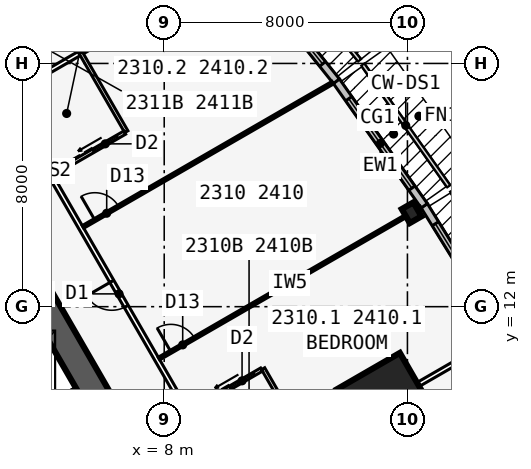
"""IFC4 building model, lengths in metres.
Left out: names, types, materials, properties, quantities, classifications, styles, units other than length and angle.
Written with IfcOpenShell. Run it as: python <this file> out.ifc"""

import sys

from ifc_helpers import new_model, si_unit, direction, frame, frame_2d, origin, origin_2d, place, context, subcontext, project, spatial, rectangle, i_section, extrude, element, fill, save


model = new_model("IFC4")
c1 = context("Model", 3, precision=1e-05, world=origin(), true_north=direction((0.0, 1.0)))
c2 = subcontext(c1, "Body", "Model", "MODEL_VIEW")
j1 = project(units=[si_unit("LENGTHUNIT", "METRE"), si_unit("PLANEANGLEUNIT", "RADIAN")], contexts=[c1])
p1 = place(None, origin())
s1 = spatial("IfcSite", under=j1, at=p1, CompositionType="ELEMENT")
p2 = place(p1, origin())
s2 = spatial("IfcBuilding", under=s1, at=p2, CompositionType="ELEMENT")
p3 = place(p2, frame((0.0, 0.0, 89.7)))
s3 = spatial("IfcBuildingStorey", under=s2, at=p3, CompositionType="ELEMENT", Elevation=89.7)
p4 = place(p3, frame((16.5, -9.526, 0.0), z_axis=(0.0, 0.0, 1.0), x_axis=(-0.499999749417, 0.866025548458, 0.0)))
e1 = element("IfcWall", 1, at=p4, inside=s3, PredefinedType="SHEAR", context=c2, shape_type="SweptSolid", body=[
    extrude(rectangle(XDim=33.0, YDim=0.9, at=frame_2d((16.5, 0.0))), origin(), (0.0, 0.0, 1.0), 3.4),
])
p5 = place(p4, frame((14.15, 0.0, 0.0)))
e2 = element("IfcOpeningElement", 2, at=p5, cuts=e1, PredefinedType="OPENING", context=c2, shape_type="SweptSolid", body=[
    extrude(rectangle(XDim=1.8, YDim=2.13, at=frame_2d((0.9, 1.065))), frame((0.0, 0.46, 0.0), z_axis=(0.0, -1.0, 0.0), x_axis=(1.0, 0.0, 0.0)), (0.0, 0.0, 1.0), 0.92),
])
p6 = place(p4, frame((12.6, 0.0, 0.0)))
e3 = element("IfcOpeningElement", 3, at=p6, cuts=e1, PredefinedType="OPENING", context=c2, shape_type="SweptSolid", body=[
    extrude(rectangle(XDim=1.0, YDim=2.13, at=frame_2d((0.5, 1.065))), frame((0.0, 0.46, 0.0), z_axis=(0.0, -1.0, 0.0), x_axis=(1.0, 0.0, 0.0)), (0.0, 0.0, 1.0), 0.92),
])
p7 = place(p3, frame((5.379, 2.586, 0.0), z_axis=(0.0, 0.0, 1.0), x_axis=(-0.500001375892, 0.866024609411, 0.0)))
e4 = element("IfcWall", 4, at=p7, inside=s3, PredefinedType="SOLIDWALL", context=c2, shape_type="SweptSolid", body=[
    extrude(rectangle(XDim=10.633, YDim=0.25, at=frame_2d((5.316, 0.0))), origin(), (0.0, 0.0, 1.0), 3.235),
])
p8 = place(p7, frame((9.164, 0.0, 0.0)))
e5 = element("IfcOpeningElement", 5, at=p8, cuts=e4, PredefinedType="OPENING", context=c2, shape_type="SweptSolid", body=[
    extrude(rectangle(XDim=0.9, YDim=2.13, at=frame_2d((0.45, 1.065))), frame((0.0, 0.135, 0.0), z_axis=(0.0, -1.0, 0.0), x_axis=(1.0, 0.0, 0.0)), (0.0, 0.0, 1.0), 0.27),
])
p9 = place(p7, frame((1.0, 0.0, 0.0)))
e6 = element("IfcOpeningElement", 6, at=p9, cuts=e4, PredefinedType="OPENING", context=c2, shape_type="SweptSolid", body=[
    extrude(rectangle(XDim=1.1, YDim=2.13, at=frame_2d((0.55, 1.065))), frame((0.0, 0.135, 0.0), z_axis=(0.0, -1.0, 0.0), x_axis=(1.0, 0.0, 0.0)), (0.0, 0.0, 1.0), 0.27),
])
p10 = place(p7, frame((3.9, 0.0, 0.0)))
e7 = element("IfcOpeningElement", 7, at=p10, cuts=e4, PredefinedType="OPENING", context=c2, shape_type="SweptSolid", body=[
    extrude(rectangle(XDim=1.1, YDim=2.13, at=frame_2d((0.55, 1.065))), frame((0.0, 0.135, 0.0), z_axis=(0.0, -1.0, 0.0), x_axis=(1.0, 0.0, 0.0)), (0.0, 0.0, 1.0), 0.27),
])
p11 = place(p7, frame((6.8, 0.0, 0.0)))
e8 = element("IfcOpeningElement", 8, at=p11, cuts=e4, PredefinedType="OPENING", context=c2, shape_type="SweptSolid", body=[
    extrude(rectangle(XDim=1.1, YDim=2.13, at=frame_2d((0.55, 1.065))), frame((0.0, 0.135, 0.0), z_axis=(0.0, -1.0, 0.0), x_axis=(1.0, 0.0, 0.0)), (0.0, 0.0, 1.0), 0.27),
])
p12 = place(p3, frame((2.429, 7.696, 0.0), z_axis=(0.0, 0.0, 1.0), x_axis=(0.866022959057, 0.500004234368, 0.0)))
e9 = element("IfcWall", 9, at=p12, inside=s3, PredefinedType="SOLIDWALL", context=c2, shape_type="SweptSolid", body=[
    extrude(rectangle(XDim=3.125, YDim=0.2, at=frame_2d((1.562, 0.0))), origin(), (0.0, 0.0, 1.0), 3.235),
])
p13 = place(p3, frame((16.137, 15.09, 0.0), z_axis=(0.0, 0.0, 1.0), x_axis=(0.866025403784, 0.5, 0.0)))
e10 = element("IfcColumn", 10, at=p13, inside=s3, PredefinedType="COLUMN", context=c2, shape_type="SweptSolid", body=[
    extrude(i_section(OverallWidth=0.442, OverallDepth=0.531, WebThickness=0.066, FlangeThickness=0.106, at=origin_2d()), origin(), (0.0, 0.0, 1.0), 3.4),
])
p14 = place(p3, frame((15.312, 8.84, 0.0), z_axis=(0.0, 0.0, 1.0), x_axis=(0.866025403784, 0.5, 0.0)))
e11 = element("IfcColumn", 11, at=p14, inside=s3, PredefinedType="COLUMN", context=c2, shape_type="SweptSolid", body=[
    extrude(rectangle(XDim=2.4, YDim=2.4, at=origin_2d()), origin(), (0.0, 0.0, 1.0), 3.4),
])
p15 = place(p3, frame((19.182, 11.071, 0.0), z_axis=(0.0, 0.0, 1.0), x_axis=(-0.526132807704, 0.850402415717, 0.0)))
e12 = element("IfcWall", 12, at=p15, inside=s3, PredefinedType="STANDARD", context=c2, shape_type="SweptSolid", body=[
    extrude(rectangle(XDim=5.002, YDim=0.25, at=frame_2d((2.501, 0.0))), origin(), (0.0, 0.0, 1.0), 3.235),
])
p16 = place(p15, frame((0.701, 0.0, 0.45)))
e13 = element("IfcOpeningElement", 13, at=p16, cuts=e12, PredefinedType="OPENING", context=c2, shape_type="SweptSolid", body=[
    extrude(rectangle(XDim=3.6, YDim=2.4, at=frame_2d((1.8, 1.2))), frame((0.0, 0.135, 0.0), z_axis=(0.0, -1.0, 0.0), x_axis=(1.0, 0.0, 0.0)), (0.0, 0.0, 1.0), 0.27),
])
p17 = place(p3, frame((16.555, 15.318, 0.0), z_axis=(0.0, 0.0, 1.0), x_axis=(-0.5766431066, 0.81699616132, 0.0)))
e14 = element("IfcWall", 14, at=p17, inside=s3, PredefinedType="STANDARD", context=c2, shape_type="SweptSolid", body=[
    extrude(rectangle(XDim=5.021, YDim=0.25, at=frame_2d((2.51, 0.0))), origin(), (0.0, 0.0, 1.0), 3.235),
])
p18 = place(p17, frame((0.71, 0.0, 0.45)))
e15 = element("IfcOpeningElement", 15, at=p18, cuts=e14, PredefinedType="OPENING", context=c2, shape_type="SweptSolid", body=[
    extrude(rectangle(XDim=3.6, YDim=2.4, at=frame_2d((1.8, 1.2))), frame((0.0, 0.135, 0.0), z_axis=(0.0, -1.0, 0.0), x_axis=(1.0, 0.0, 0.0)), (0.0, 0.0, 1.0), 0.27),
])
p19 = place(p3, frame((13.664, 19.414, 0.0), z_axis=(0.0, 0.0, 1.0), x_axis=(-0.624594965756, 0.780948864364, 0.0)))
e16 = element("IfcWall", 16, at=p19, inside=s3, PredefinedType="STANDARD", context=c2, shape_type="SweptSolid", body=[
    extrude(rectangle(XDim=5.058, YDim=0.25, at=frame_2d((2.529, 0.0))), origin(), (0.0, 0.0, 1.0), 3.235),
])
p20 = place(p19, frame((0.729, 0.0, 0.45)))
e17 = element("IfcOpeningElement", 17, at=p20, cuts=e16, PredefinedType="OPENING", context=c2, shape_type="SweptSolid", body=[
    extrude(rectangle(XDim=3.6, YDim=2.4, at=frame_2d((1.8, 1.2))), frame((0.0, 0.135, 0.0), z_axis=(0.0, -1.0, 0.0), x_axis=(1.0, 0.0, 0.0)), (0.0, 0.0, 1.0), 0.27),
])
p21 = place(p3, frame((20.027, -10.985, 0.0), z_axis=(0.0, 0.0, 1.0), x_axis=(-0.500001677587, 0.866024435227, 0.0)))
e18 = element("IfcWall", 18, at=p21, inside=s3, PredefinedType="PARTITIONING", context=c2, shape_type="SweptSolid", body=[
    extrude(rectangle(XDim=39.054, YDim=0.15, at=frame_2d((19.527, 0.0))), origin(), (0.0, 0.0, 1.0), 3.235),
])
p22 = place(p21, frame((0.352, 0.0, 0.0)))
e19 = element("IfcOpeningElement", 19, at=p22, cuts=e18, PredefinedType="OPENING", context=c2, shape_type="SweptSolid", body=[
    extrude(rectangle(XDim=0.95, YDim=2.13, at=frame_2d((0.475, 1.065))), frame((0.0, 0.085, 0.0), z_axis=(0.0, -1.0, 0.0), x_axis=(1.0, 0.0, 0.0)), (0.0, 0.0, 1.0), 0.17),
])
p23 = place(p21, frame((10.352, 0.0, 0.0)))
e20 = element("IfcOpeningElement", 20, at=p23, cuts=e18, PredefinedType="OPENING", context=c2, shape_type="SweptSolid", body=[
    extrude(rectangle(XDim=0.95, YDim=2.13, at=frame_2d((0.475, 1.065))), frame((0.0, 0.085, 0.0), z_axis=(0.0, -1.0, 0.0), x_axis=(1.0, 0.0, 0.0)), (0.0, 0.0, 1.0), 0.17),
])
p24 = place(p21, frame((17.752, 0.0, 0.0)))
e21 = element("IfcOpeningElement", 21, at=p24, cuts=e18, PredefinedType="OPENING", context=c2, shape_type="SweptSolid", body=[
    extrude(rectangle(XDim=0.95, YDim=2.13, at=frame_2d((0.475, 1.065))), frame((0.0, 0.085, 0.0), z_axis=(0.0, -1.0, 0.0), x_axis=(1.0, 0.0, 0.0)), (0.0, 0.0, 1.0), 0.17),
])
p25 = place(p21, frame((26.552, 0.0, 0.0)))
e22 = element("IfcOpeningElement", 22, at=p25, cuts=e18, PredefinedType="OPENING", context=c2, shape_type="SweptSolid", body=[
    extrude(rectangle(XDim=0.95, YDim=2.13, at=frame_2d((0.475, 1.065))), frame((0.0, 0.085, 0.0), z_axis=(0.0, -1.0, 0.0), x_axis=(1.0, 0.0, 0.0)), (0.0, 0.0, 1.0), 0.17),
])
p26 = place(p21, frame((37.752, 0.0, 0.0)))
e23 = element("IfcOpeningElement", 23, at=p26, cuts=e18, PredefinedType="OPENING", context=c2, shape_type="SweptSolid", body=[
    extrude(rectangle(XDim=0.95, YDim=2.13, at=frame_2d((0.475, 1.065))), frame((0.0, 0.085, 0.0), z_axis=(0.0, -1.0, 0.0), x_axis=(1.0, 0.0, 0.0)), (0.0, 0.0, 1.0), 0.17),
])
p27 = place(p3, frame((10.329, 5.963, 0.0), z_axis=(0.0, 0.0, 1.0), x_axis=(0.866021688545, 0.500006434927, 0.0)))
e24 = element("IfcWall", 24, at=p27, inside=s3, PredefinedType="PARTITIONING", context=c2, shape_type="SweptSolid", body=[
    extrude(rectangle(XDim=10.096, YDim=0.15, at=frame_2d((5.048, 0.0))), origin(), (0.0, 0.0, 1.0), 2.389),
])
p28 = place(p3, frame((7.829, 10.293, 0.0), z_axis=(0.0, 0.0, 1.0), x_axis=(0.866016302457, 0.50001576363, 0.0)))
e25 = element("IfcWall", 25, at=p28, inside=s3, PredefinedType="PARTITIONING", context=c2, shape_type="SweptSolid", body=[
    extrude(rectangle(XDim=9.943, YDim=0.1, at=frame_2d((4.972, 0.0))), origin(), (0.0, 0.0, 1.0), 2.389),
])
p29 = place(p28, frame((0.45, 0.0, 0.0)))
e26 = element("IfcOpeningElement", 26, at=p29, cuts=e25, PredefinedType="OPENING", context=c2, shape_type="SweptSolid", body=[
    extrude(rectangle(XDim=0.9, YDim=2.13, at=frame_2d((0.45, 1.065))), frame((0.0, 0.06, 0.0), z_axis=(0.0, -1.0, 0.0), x_axis=(1.0, 0.0, 0.0)), (0.0, 0.0, 1.0), 0.12),
])
p30 = place(p3, frame((5.329, 14.623, 0.0), z_axis=(0.0, 0.0, 1.0), x_axis=(0.866018409083, 0.500012114982, 0.0)))
e27 = element("IfcWall", 27, at=p30, inside=s3, PredefinedType="PARTITIONING", context=c2, shape_type="SweptSolid", body=[
    extrude(rectangle(XDim=9.485, YDim=0.1, at=frame_2d((4.742, 0.0))), origin(), (0.0, 0.0, 1.0), 2.389),
])
p31 = place(p30, frame((0.45, 0.0, 0.0)))
e28 = element("IfcOpeningElement", 28, at=p31, cuts=e27, PredefinedType="OPENING", context=c2, shape_type="SweptSolid", body=[
    extrude(rectangle(XDim=0.9, YDim=2.13, at=frame_2d((0.45, 1.065))), frame((0.0, 0.06, 0.0), z_axis=(0.0, -1.0, 0.0), x_axis=(1.0, 0.0, 0.0)), (0.0, 0.0, 1.0), 0.12),
])
p32 = place(p3, frame((2.829, 18.954, 0.0), z_axis=(0.0, 0.0, 1.0), x_axis=(0.866020536561, 0.500008430184, 0.0)))
e29 = element("IfcWall", 29, at=p32, inside=s3, PredefinedType="PARTITIONING", context=c2, shape_type="SweptSolid", body=[
    extrude(rectangle(XDim=8.72, YDim=0.15, at=frame_2d((4.36, 0.0))), origin(), (0.0, 0.0, 1.0), 2.389),
])
p33 = place(p3, frame((12.753, 7.363, 0.0), z_axis=(0.0, 0.0, 1.0), x_axis=(-0.499990139034, 0.866031096941, 0.0)))
e30 = element("IfcWall", 30, at=p33, inside=s3, PredefinedType="PLUMBINGWALL", context=c2, shape_type="SweptSolid", body=[
    extrude(rectangle(XDim=3.0, YDim=0.12, at=frame_2d((1.5, 0.0))), origin(), (0.0, 0.0, 1.0), 3.235),
])
p34 = place(p3, frame((8.829, 8.561, 0.0), z_axis=(0.0, 0.0, 1.0), x_axis=(0.866035715982, 0.499982138324, 0.0)))
e31 = element("IfcWall", 31, at=p34, inside=s3, PredefinedType="PLUMBINGWALL", context=c2, shape_type="SweptSolid", body=[
    extrude(rectangle(XDim=2.74, YDim=0.12, at=frame_2d((1.37, 0.0))), origin(), (0.0, 0.0, 1.0), 3.235),
])
p35 = place(p34, frame((1.55, 0.0, 0.0)))
e32 = element("IfcOpeningElement", 32, at=p35, cuts=e31, PredefinedType="OPENING", context=c2, shape_type="SweptSolid", body=[
    extrude(rectangle(XDim=0.9, YDim=2.13, at=frame_2d((0.45, 1.065))), frame((0.0, 0.07, 0.0), z_axis=(0.0, -1.0, 0.0), x_axis=(1.0, 0.0, 0.0)), (0.0, 0.0, 1.0), 0.14),
])
p36 = place(p3, frame((6.753, 17.755, 0.0), z_axis=(0.0, 0.0, 1.0), x_axis=(-0.499990139034, 0.866031096941, 0.0)))
e33 = element("IfcWall", 33, at=p36, inside=s3, PredefinedType="PLUMBINGWALL", context=c2, shape_type="SweptSolid", body=[
    extrude(rectangle(XDim=3.0, YDim=0.12, at=frame_2d((1.5, 0.0))), origin(), (0.0, 0.0, 1.0), 3.235),
])
p37 = place(p3, frame((4.329, 16.355, 0.0), z_axis=(0.0, 0.0, 1.0), x_axis=(0.866035715982, 0.499982138324, 0.0)))
e34 = element("IfcWall", 34, at=p37, inside=s3, PredefinedType="PLUMBINGWALL", context=c2, shape_type="SweptSolid", body=[
    extrude(rectangle(XDim=2.74, YDim=0.12, at=frame_2d((1.37, 0.0))), origin(), (0.0, 0.0, 1.0), 3.235),
])
p38 = place(p37, frame((1.55, 0.0, 0.0)))
e35 = element("IfcOpeningElement", 35, at=p38, cuts=e34, PredefinedType="OPENING", context=c2, shape_type="SweptSolid", body=[
    extrude(rectangle(XDim=0.9, YDim=2.13, at=frame_2d((0.45, 1.065))), frame((0.0, 0.07, 0.0), z_axis=(0.0, -1.0, 0.0), x_axis=(1.0, 0.0, 0.0)), (0.0, 0.0, 1.0), 0.14),
])
p39 = place(p3, frame((5.253, 20.354, 0.0), z_axis=(0.0, 0.0, 1.0), x_axis=(-0.499990139034, 0.866031096941, 0.0)))
e36 = element("IfcWall", 36, at=p39, inside=s3, PredefinedType="PLUMBINGWALL", context=c2, shape_type="SweptSolid", body=[
    extrude(rectangle(XDim=3.0, YDim=0.12, at=frame_2d((1.5, 0.0))), origin(), (0.0, 0.0, 1.0), 3.235),
])
p40 = place(p16, origin())
e37 = element("IfcWindow", 37, at=p40, inside=s3, PartitioningType="SINGLE_PANEL", PredefinedType="WINDOW", context=c2, shape_type="SweptSolid", body=[
    extrude(rectangle(XDim=3.6, YDim=2.4, at=frame_2d((1.8, 1.2))), frame((0.0, 0.03, 0.0), z_axis=(0.0, -1.0, 0.0), x_axis=(1.0, 0.0, 0.0)), (0.0, 0.0, 1.0), 0.06),
])
fill(e13, e37)
p41 = place(p18, origin())
e38 = element("IfcWindow", 38, at=p41, inside=s3, PartitioningType="SINGLE_PANEL", PredefinedType="WINDOW", context=c2, shape_type="SweptSolid", body=[
    extrude(rectangle(XDim=3.6, YDim=2.4, at=frame_2d((1.8, 1.2))), frame((0.0, 0.03, 0.0), z_axis=(0.0, -1.0, 0.0), x_axis=(1.0, 0.0, 0.0)), (0.0, 0.0, 1.0), 0.06),
])
fill(e15, e38)
p42 = place(p20, origin())
e39 = element("IfcWindow", 39, at=p42, inside=s3, PartitioningType="SINGLE_PANEL", PredefinedType="WINDOW", context=c2, shape_type="SweptSolid", body=[
    extrude(rectangle(XDim=3.6, YDim=2.4, at=frame_2d((1.8, 1.2))), frame((0.0, 0.03, 0.0), z_axis=(0.0, -1.0, 0.0), x_axis=(1.0, 0.0, 0.0)), (0.0, 0.0, 1.0), 0.06),
])
fill(e17, e39)
p43 = place(p29, origin())
e40 = element("IfcDoor", 40, at=p43, inside=s3, OperationType="SINGLE_SWING_LEFT", PredefinedType="DOOR", context=c2, shape_type="SweptSolid", body=[
    extrude(rectangle(XDim=0.9, YDim=2.13, at=frame_2d((0.45, 1.065))), frame((0.0, 0.025, 0.0), z_axis=(0.0, -1.0, 0.0), x_axis=(1.0, 0.0, 0.0)), (0.0, 0.0, 1.0), 0.05),
])
fill(e26, e40)
p44 = place(p31, origin())
e41 = element("IfcDoor", 41, at=p44, inside=s3, OperationType="SINGLE_SWING_LEFT", PredefinedType="DOOR", context=c2, shape_type="SweptSolid", body=[
    extrude(rectangle(XDim=0.9, YDim=2.13, at=frame_2d((0.45, 1.065))), frame((0.0, 0.025, 0.0), z_axis=(0.0, -1.0, 0.0), x_axis=(1.0, 0.0, 0.0)), (0.0, 0.0, 1.0), 0.05),
])
fill(e28, e41)
p45 = place(p35, origin())
e42 = element("IfcDoor", 42, at=p45, inside=s3, OperationType="SLIDING_TO_LEFT", PredefinedType="DOOR", context=c2, shape_type="SweptSolid", body=[
    extrude(rectangle(XDim=0.9, YDim=2.13, at=frame_2d((0.45, 1.065))), frame((0.0, 0.025, 0.0), z_axis=(0.0, -1.0, 0.0), x_axis=(1.0, 0.0, 0.0)), (0.0, 0.0, 1.0), 0.05),
])
fill(e32, e42)
p46 = place(p25, origin())
e43 = element("IfcDoor", 43, at=p46, inside=s3, OperationType="SINGLE_SWING_RIGHT", PredefinedType="DOOR", context=c2, shape_type="SweptSolid", body=[
    extrude(rectangle(XDim=0.95, YDim=2.13, at=frame_2d((0.475, 1.065))), frame((0.0, 0.025, 0.0), z_axis=(0.0, -1.0, 0.0), x_axis=(1.0, 0.0, 0.0)), (0.0, 0.0, 1.0), 0.05),
])
fill(e22, e43)
p47 = place(p38, origin())
e44 = element("IfcDoor", 44, at=p47, inside=s3, OperationType="SLIDING_TO_LEFT", PredefinedType="DOOR", context=c2, shape_type="SweptSolid", body=[
    extrude(rectangle(XDim=0.9, YDim=2.13, at=frame_2d((0.45, 1.065))), frame((0.0, 0.025, 0.0), z_axis=(0.0, -1.0, 0.0), x_axis=(1.0, 0.0, 0.0)), (0.0, 0.0, 1.0), 0.05),
])
fill(e35, e44)
save(model, sys.argv[1])
